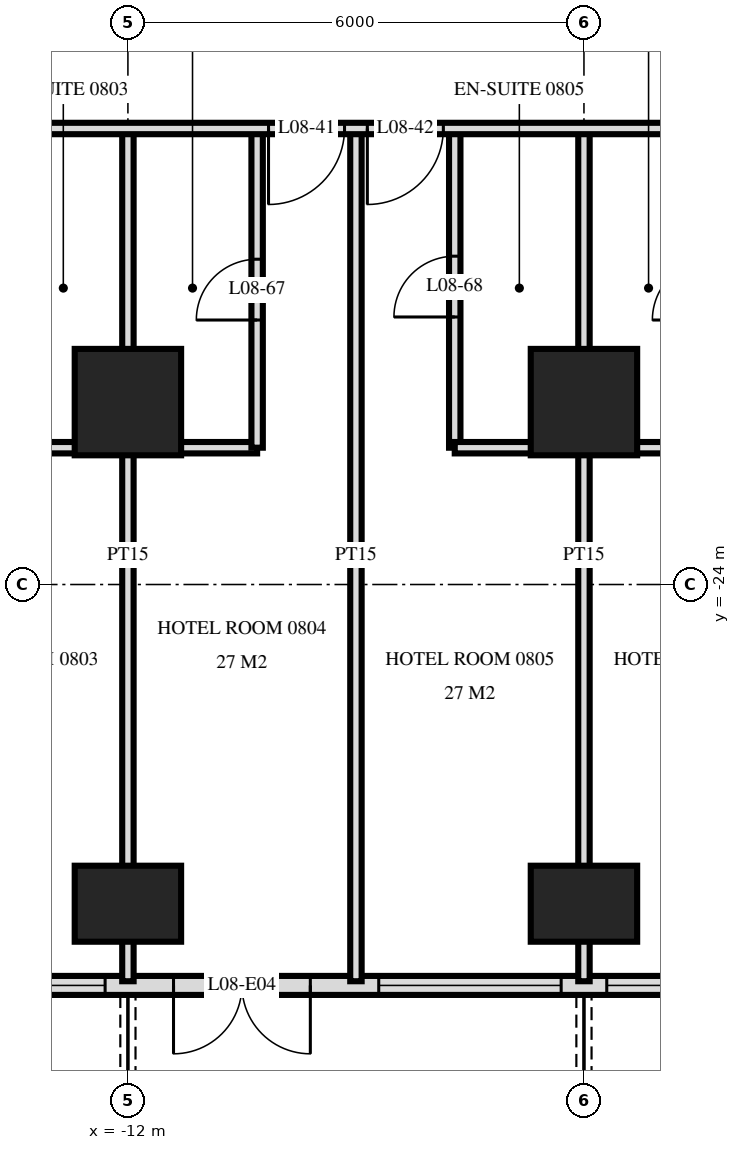
"""IFC4 building model, lengths in metres.
Left out: names, types, materials, properties, quantities, classifications, styles, units other than length and angle.
Written with IfcOpenShell. Run it as: python <this file> out.ifc"""

import sys

from ifc_helpers import new_model, si_unit, direction, frame, frame_2d, origin, origin_2d, place, context, subcontext, project, spatial, rectangle, extrude, element, fill, save


model = new_model("IFC4")
c1 = context("Model", 3, precision=1e-05, world=origin(), true_north=direction((0.0, 1.0)))
c2 = subcontext(c1, "Body", "Model", "MODEL_VIEW")
j1 = project(units=[si_unit("LENGTHUNIT", "METRE"), si_unit("PLANEANGLEUNIT", "RADIAN")], contexts=[c1])
p1 = place(None, origin())
s1 = spatial("IfcSite", under=j1, at=p1, CompositionType="ELEMENT")
p2 = place(p1, origin())
s2 = spatial("IfcBuilding", under=s1, at=p2, CompositionType="ELEMENT")
p3 = place(p2, frame((0.0, 0.0, 38.4)))
s3 = spatial("IfcBuildingStorey", under=s2, at=p3, CompositionType="ELEMENT", Elevation=38.4)
p4 = place(p3, frame((-12.0, -28.2, 0.0), z_axis=(0.0, 0.0, 1.0), x_axis=(1.0, 0.0, 0.0)))
e1 = element("IfcColumn", 1, at=p4, inside=s3, PredefinedType="COLUMN", context=c2, shape_type="SweptSolid", body=[
    extrude(rectangle(XDim=1.4, YDim=1.0, at=origin_2d()), origin(), (0.0, 0.0, 1.0), 3.6),
])
p5 = place(p3, frame((-12.0, -21.6, 0.0), z_axis=(0.0, 0.0, 1.0), x_axis=(1.0, 0.0, 0.0)))
e2 = element("IfcColumn", 2, at=p5, inside=s3, PredefinedType="COLUMN", context=c2, shape_type="SweptSolid", body=[
    extrude(rectangle(XDim=1.4, YDim=1.4, at=origin_2d()), origin(), (0.0, 0.0, 1.0), 3.6),
])
p6 = place(p3, frame((-6.0, -28.2, 0.0), z_axis=(0.0, 0.0, 1.0), x_axis=(1.0, 0.0, 0.0)))
e3 = element("IfcColumn", 3, at=p6, inside=s3, PredefinedType="COLUMN", context=c2, shape_type="SweptSolid", body=[
    extrude(rectangle(XDim=1.4, YDim=1.0, at=origin_2d()), origin(), (0.0, 0.0, 1.0), 3.6),
])
p7 = place(p3, frame((-6.0, -21.6, 0.0), z_axis=(0.0, 0.0, 1.0), x_axis=(1.0, 0.0, 0.0)))
e4 = element("IfcColumn", 4, at=p7, inside=s3, PredefinedType="COLUMN", context=c2, shape_type="SweptSolid", body=[
    extrude(rectangle(XDim=1.4, YDim=1.4, at=origin_2d()), origin(), (0.0, 0.0, 1.0), 3.6),
])
p8 = place(p3, frame((-28.775, -29.275, 0.0), z_axis=(0.0, 0.0, 1.0), x_axis=(1.0, 0.0, 0.0)))
e5 = element("IfcWall", 5, at=p8, inside=s3, PredefinedType="SOLIDWALL", context=c2, shape_type="SweptSolid", body=[
    extrude(rectangle(XDim=57.551, YDim=0.25, at=frame_2d((28.775, 0.0))), origin(), (0.0, 0.0, 1.0), 3.32),
])
p9 = place(p8, frame((0.575, 0.0, 0.0)))
e6 = element("IfcOpeningElement", 6, at=p9, cuts=e5, PredefinedType="OPENING", context=c2, shape_type="SweptSolid", body=[
    extrude(rectangle(XDim=1.8, YDim=2.4, at=frame_2d((0.9, 1.2))), frame((0.0, 0.135, 0.0), z_axis=(0.0, -1.0, 0.0), x_axis=(1.0, 0.0, 0.0)), (0.0, 0.0, 1.0), 0.27),
])
p10 = place(p8, frame((5.375, 0.0, 0.0)))
e7 = element("IfcOpeningElement", 7, at=p10, cuts=e5, PredefinedType="OPENING", context=c2, shape_type="SweptSolid", body=[
    extrude(rectangle(XDim=1.8, YDim=2.4, at=frame_2d((0.9, 1.2))), frame((0.0, 0.135, 0.0), z_axis=(0.0, -1.0, 0.0), x_axis=(1.0, 0.0, 0.0)), (0.0, 0.0, 1.0), 0.27),
])
p11 = place(p8, frame((8.075, 0.0, 0.3)))
e8 = element("IfcOpeningElement", 8, at=p11, cuts=e5, PredefinedType="OPENING", context=c2, shape_type="SweptSolid", body=[
    extrude(rectangle(XDim=2.4, YDim=2.1, at=frame_2d((1.2, 1.05))), frame((0.0, 0.135, 0.0), z_axis=(0.0, -1.0, 0.0), x_axis=(1.0, 0.0, 0.0)), (0.0, 0.0, 1.0), 0.27),
])
p12 = place(p8, frame((11.375, 0.0, 0.0)))
e9 = element("IfcOpeningElement", 9, at=p12, cuts=e5, PredefinedType="OPENING", context=c2, shape_type="SweptSolid", body=[
    extrude(rectangle(XDim=1.8, YDim=2.4, at=frame_2d((0.9, 1.2))), frame((0.0, 0.135, 0.0), z_axis=(0.0, -1.0, 0.0), x_axis=(1.0, 0.0, 0.0)), (0.0, 0.0, 1.0), 0.27),
])
p13 = place(p8, frame((14.075, 0.0, 0.3)))
e10 = element("IfcOpeningElement", 10, at=p13, cuts=e5, PredefinedType="OPENING", context=c2, shape_type="SweptSolid", body=[
    extrude(rectangle(XDim=2.4, YDim=2.1, at=frame_2d((1.2, 1.05))), frame((0.0, 0.135, 0.0), z_axis=(0.0, -1.0, 0.0), x_axis=(1.0, 0.0, 0.0)), (0.0, 0.0, 1.0), 0.27),
])
p14 = place(p8, frame((17.375, 0.0, 0.0)))
e11 = element("IfcOpeningElement", 11, at=p14, cuts=e5, PredefinedType="OPENING", context=c2, shape_type="SweptSolid", body=[
    extrude(rectangle(XDim=1.8, YDim=2.4, at=frame_2d((0.9, 1.2))), frame((0.0, 0.135, 0.0), z_axis=(0.0, -1.0, 0.0), x_axis=(1.0, 0.0, 0.0)), (0.0, 0.0, 1.0), 0.27),
])
p15 = place(p8, frame((20.075, 0.0, 0.3)))
e12 = element("IfcOpeningElement", 12, at=p15, cuts=e5, PredefinedType="OPENING", context=c2, shape_type="SweptSolid", body=[
    extrude(rectangle(XDim=2.4, YDim=2.1, at=frame_2d((1.2, 1.05))), frame((0.0, 0.135, 0.0), z_axis=(0.0, -1.0, 0.0), x_axis=(1.0, 0.0, 0.0)), (0.0, 0.0, 1.0), 0.27),
])
p16 = place(p8, frame((23.075, 0.0, 0.3)))
e13 = element("IfcOpeningElement", 13, at=p16, cuts=e5, PredefinedType="OPENING", context=c2, shape_type="SweptSolid", body=[
    extrude(rectangle(XDim=2.4, YDim=2.1, at=frame_2d((1.2, 1.05))), frame((0.0, 0.135, 0.0), z_axis=(0.0, -1.0, 0.0), x_axis=(1.0, 0.0, 0.0)), (0.0, 0.0, 1.0), 0.27),
])
p17 = place(p8, frame((26.375, 0.0, 0.0)))
e14 = element("IfcOpeningElement", 14, at=p17, cuts=e5, PredefinedType="OPENING", context=c2, shape_type="SweptSolid", body=[
    extrude(rectangle(XDim=1.8, YDim=2.4, at=frame_2d((0.9, 1.2))), frame((0.0, 0.135, 0.0), z_axis=(0.0, -1.0, 0.0), x_axis=(1.0, 0.0, 0.0)), (0.0, 0.0, 1.0), 0.27),
])
p18 = place(p8, frame((29.375, 0.0, 0.0)))
e15 = element("IfcOpeningElement", 15, at=p18, cuts=e5, PredefinedType="OPENING", context=c2, shape_type="SweptSolid", body=[
    extrude(rectangle(XDim=1.8, YDim=2.4, at=frame_2d((0.9, 1.2))), frame((0.0, 0.135, 0.0), z_axis=(0.0, -1.0, 0.0), x_axis=(1.0, 0.0, 0.0)), (0.0, 0.0, 1.0), 0.27),
])
p19 = place(p8, frame((32.075, 0.0, 0.3)))
e16 = element("IfcOpeningElement", 16, at=p19, cuts=e5, PredefinedType="OPENING", context=c2, shape_type="SweptSolid", body=[
    extrude(rectangle(XDim=2.4, YDim=2.1, at=frame_2d((1.2, 1.05))), frame((0.0, 0.135, 0.0), z_axis=(0.0, -1.0, 0.0), x_axis=(1.0, 0.0, 0.0)), (0.0, 0.0, 1.0), 0.27),
])
p20 = place(p8, frame((35.375, 0.0, 0.0)))
e17 = element("IfcOpeningElement", 17, at=p20, cuts=e5, PredefinedType="OPENING", context=c2, shape_type="SweptSolid", body=[
    extrude(rectangle(XDim=1.8, YDim=2.4, at=frame_2d((0.9, 1.2))), frame((0.0, 0.135, 0.0), z_axis=(0.0, -1.0, 0.0), x_axis=(1.0, 0.0, 0.0)), (0.0, 0.0, 1.0), 0.27),
])
p21 = place(p8, frame((38.075, 0.0, 0.3)))
e18 = element("IfcOpeningElement", 18, at=p21, cuts=e5, PredefinedType="OPENING", context=c2, shape_type="SweptSolid", body=[
    extrude(rectangle(XDim=2.4, YDim=2.1, at=frame_2d((1.2, 1.05))), frame((0.0, 0.135, 0.0), z_axis=(0.0, -1.0, 0.0), x_axis=(1.0, 0.0, 0.0)), (0.0, 0.0, 1.0), 0.27),
])
p22 = place(p8, frame((41.375, 0.0, 0.0)))
e19 = element("IfcOpeningElement", 19, at=p22, cuts=e5, PredefinedType="OPENING", context=c2, shape_type="SweptSolid", body=[
    extrude(rectangle(XDim=1.8, YDim=2.4, at=frame_2d((0.9, 1.2))), frame((0.0, 0.135, 0.0), z_axis=(0.0, -1.0, 0.0), x_axis=(1.0, 0.0, 0.0)), (0.0, 0.0, 1.0), 0.27),
])
p23 = place(p8, frame((44.075, 0.0, 0.3)))
e20 = element("IfcOpeningElement", 20, at=p23, cuts=e5, PredefinedType="OPENING", context=c2, shape_type="SweptSolid", body=[
    extrude(rectangle(XDim=2.4, YDim=2.1, at=frame_2d((1.2, 1.05))), frame((0.0, 0.135, 0.0), z_axis=(0.0, -1.0, 0.0), x_axis=(1.0, 0.0, 0.0)), (0.0, 0.0, 1.0), 0.27),
])
p24 = place(p8, frame((47.375, 0.0, 0.0)))
e21 = element("IfcOpeningElement", 21, at=p24, cuts=e5, PredefinedType="OPENING", context=c2, shape_type="SweptSolid", body=[
    extrude(rectangle(XDim=1.8, YDim=2.4, at=frame_2d((0.9, 1.2))), frame((0.0, 0.135, 0.0), z_axis=(0.0, -1.0, 0.0), x_axis=(1.0, 0.0, 0.0)), (0.0, 0.0, 1.0), 0.27),
])
p25 = place(p8, frame((50.075, 0.0, 0.3)))
e22 = element("IfcOpeningElement", 22, at=p25, cuts=e5, PredefinedType="OPENING", context=c2, shape_type="SweptSolid", body=[
    extrude(rectangle(XDim=2.4, YDim=2.1, at=frame_2d((1.2, 1.05))), frame((0.0, 0.135, 0.0), z_axis=(0.0, -1.0, 0.0), x_axis=(1.0, 0.0, 0.0)), (0.0, 0.0, 1.0), 0.27),
])
p26 = place(p8, frame((53.375, 0.0, 0.0)))
e23 = element("IfcOpeningElement", 23, at=p26, cuts=e5, PredefinedType="OPENING", context=c2, shape_type="SweptSolid", body=[
    extrude(rectangle(XDim=1.8, YDim=2.4, at=frame_2d((0.9, 1.2))), frame((0.0, 0.135, 0.0), z_axis=(0.0, -1.0, 0.0), x_axis=(1.0, 0.0, 0.0)), (0.0, 0.0, 1.0), 0.27),
])
p27 = place(p3, frame((-6.0, -29.22, 0.0), z_axis=(0.0, 0.0, 1.0), x_axis=(0.0, 1.0, 0.0)))
e24 = element("IfcWall", 24, at=p27, inside=s3, PredefinedType="PARTITIONING", context=c2, shape_type="SweptSolid", body=[
    extrude(rectangle(XDim=11.22, YDim=0.15, at=frame_2d((5.61, 0.0))), origin(), (0.0, 0.0, 1.0), 3.32),
])
p28 = place(p3, frame((-7.7, -22.2, 0.0), z_axis=(0.0, 0.0, 1.0), x_axis=(0.0, 1.0, 0.0)))
e25 = element("IfcWall", 25, at=p28, inside=s3, PredefinedType="PARTITIONING", context=c2, shape_type="SweptSolid", body=[
    extrude(rectangle(XDim=4.2, YDim=0.15, at=frame_2d((2.1, 0.0))), origin(), (0.0, 0.0, 1.0), 3.32),
])
p29 = place(p28, frame((1.72, 0.0, 0.0)))
e26 = element("IfcOpeningElement", 26, at=p29, cuts=e25, PredefinedType="OPENING", context=c2, shape_type="SweptSolid", body=[
    extrude(rectangle(XDim=0.8, YDim=2.1, at=frame_2d((0.4, 1.05))), frame((0.0, 0.085, 0.0), z_axis=(0.0, -1.0, 0.0), x_axis=(1.0, 0.0, 0.0)), (0.0, 0.0, 1.0), 0.17),
])
p30 = place(p3, frame((-9.0, -29.22, 0.0), z_axis=(0.0, 0.0, 1.0), x_axis=(0.0, 1.0, 0.0)))
e27 = element("IfcWall", 27, at=p30, inside=s3, PredefinedType="PARTITIONING", context=c2, shape_type="SweptSolid", body=[
    extrude(rectangle(XDim=11.22, YDim=0.15, at=frame_2d((5.61, 0.0))), origin(), (0.0, 0.0, 1.0), 3.32),
])
p31 = place(p3, frame((-10.3, -22.2, 0.0), z_axis=(0.0, 0.0, 1.0), x_axis=(0.0, 1.0, 0.0)))
e28 = element("IfcWall", 28, at=p31, inside=s3, PredefinedType="PARTITIONING", context=c2, shape_type="SweptSolid", body=[
    extrude(rectangle(XDim=4.2, YDim=0.15, at=frame_2d((2.1, 0.0))), origin(), (0.0, 0.0, 1.0), 3.32),
])
p32 = place(p31, frame((1.68, 0.0, 0.0)))
e29 = element("IfcOpeningElement", 29, at=p32, cuts=e28, PredefinedType="OPENING", context=c2, shape_type="SweptSolid", body=[
    extrude(rectangle(XDim=0.8, YDim=2.1, at=frame_2d((0.4, 1.05))), frame((0.0, 0.085, 0.0), z_axis=(0.0, -1.0, 0.0), x_axis=(1.0, 0.0, 0.0)), (0.0, 0.0, 1.0), 0.17),
])
p33 = place(p3, frame((-12.0, -29.22, 0.0), z_axis=(0.0, 0.0, 1.0), x_axis=(0.0, 1.0, 0.0)))
e30 = element("IfcWall", 30, at=p33, inside=s3, PredefinedType="PARTITIONING", context=c2, shape_type="SweptSolid", body=[
    extrude(rectangle(XDim=11.22, YDim=0.15, at=frame_2d((5.61, 0.0))), origin(), (0.0, 0.0, 1.0), 3.32),
])
for number, where, z_axis, x_axis in (
    (31, (-13.7, -22.2, 0.0), (0.0, 0.0, 1.0), (1.0, 0.0, 0.0)),
    (32, (-7.7, -22.2, 0.0), (0.0, 0.0, 1.0), (1.0, 0.0, 0.0)),
):
    element("IfcWall", number, at=place(p3, frame(where, z_axis=z_axis, x_axis=x_axis)), inside=s3, PredefinedType="PARTITIONING", context=c2, shape_type="SweptSolid", body=[
        extrude(rectangle(XDim=3.4, YDim=0.15, at=frame_2d((1.7, 0.0))), origin(), (0.0, 0.0, 1.0), 3.32),
    ])
p34 = place(p3, frame((-33.12, -18.0, 0.0), z_axis=(0.0, 0.0, 1.0), x_axis=(1.0, 0.0, 0.0)))
e33 = element("IfcWall", 33, at=p34, inside=s3, PredefinedType="PARTITIONING", context=c2, shape_type="SweptSolid", body=[
    extrude(rectangle(XDim=66.24, YDim=0.15, at=frame_2d((33.12, 0.0))), origin(), (0.0, 0.0, 1.0), 3.32),
])
p35 = place(p34, frame((12.27, 0.0, 0.0)))
e34 = element("IfcOpeningElement", 34, at=p35, cuts=e33, PredefinedType="OPENING", context=c2, shape_type="SweptSolid", body=[
    extrude(rectangle(XDim=1.0, YDim=2.1, at=frame_2d((0.5, 1.05))), frame((0.0, 0.085, 0.0), z_axis=(0.0, -1.0, 0.0), x_axis=(1.0, 0.0, 0.0)), (0.0, 0.0, 1.0), 0.17),
])
p36 = place(p34, frame((16.97, 0.0, 0.0)))
e35 = element("IfcOpeningElement", 35, at=p36, cuts=e33, PredefinedType="OPENING", context=c2, shape_type="SweptSolid", body=[
    extrude(rectangle(XDim=1.0, YDim=2.1, at=frame_2d((0.5, 1.05))), frame((0.0, 0.085, 0.0), z_axis=(0.0, -1.0, 0.0), x_axis=(1.0, 0.0, 0.0)), (0.0, 0.0, 1.0), 0.17),
])
p37 = place(p34, frame((18.27, 0.0, 0.0)))
e36 = element("IfcOpeningElement", 36, at=p37, cuts=e33, PredefinedType="OPENING", context=c2, shape_type="SweptSolid", body=[
    extrude(rectangle(XDim=1.0, YDim=2.1, at=frame_2d((0.5, 1.05))), frame((0.0, 0.085, 0.0), z_axis=(0.0, -1.0, 0.0), x_axis=(1.0, 0.0, 0.0)), (0.0, 0.0, 1.0), 0.17),
])
p38 = place(p34, frame((22.97, 0.0, 0.0)))
e37 = element("IfcOpeningElement", 37, at=p38, cuts=e33, PredefinedType="OPENING", context=c2, shape_type="SweptSolid", body=[
    extrude(rectangle(XDim=1.0, YDim=2.1, at=frame_2d((0.5, 1.05))), frame((0.0, 0.085, 0.0), z_axis=(0.0, -1.0, 0.0), x_axis=(1.0, 0.0, 0.0)), (0.0, 0.0, 1.0), 0.17),
])
p39 = place(p34, frame((24.27, 0.0, 0.0)))
e38 = element("IfcOpeningElement", 38, at=p39, cuts=e33, PredefinedType="OPENING", context=c2, shape_type="SweptSolid", body=[
    extrude(rectangle(XDim=1.0, YDim=2.1, at=frame_2d((0.5, 1.05))), frame((0.0, 0.085, 0.0), z_axis=(0.0, -1.0, 0.0), x_axis=(1.0, 0.0, 0.0)), (0.0, 0.0, 1.0), 0.17),
])
p40 = place(p34, frame((28.97, 0.0, 0.0)))
e39 = element("IfcOpeningElement", 39, at=p40, cuts=e33, PredefinedType="OPENING", context=c2, shape_type="SweptSolid", body=[
    extrude(rectangle(XDim=1.0, YDim=2.1, at=frame_2d((0.5, 1.05))), frame((0.0, 0.085, 0.0), z_axis=(0.0, -1.0, 0.0), x_axis=(1.0, 0.0, 0.0)), (0.0, 0.0, 1.0), 0.17),
])
p41 = place(p34, frame((30.27, 0.0, 0.0)))
e40 = element("IfcOpeningElement", 40, at=p41, cuts=e33, PredefinedType="OPENING", context=c2, shape_type="SweptSolid", body=[
    extrude(rectangle(XDim=1.0, YDim=2.1, at=frame_2d((0.5, 1.05))), frame((0.0, 0.085, 0.0), z_axis=(0.0, -1.0, 0.0), x_axis=(1.0, 0.0, 0.0)), (0.0, 0.0, 1.0), 0.17),
])
p42 = place(p34, frame((34.97, 0.0, 0.0)))
e41 = element("IfcOpeningElement", 41, at=p42, cuts=e33, PredefinedType="OPENING", context=c2, shape_type="SweptSolid", body=[
    extrude(rectangle(XDim=1.0, YDim=2.1, at=frame_2d((0.5, 1.05))), frame((0.0, 0.085, 0.0), z_axis=(0.0, -1.0, 0.0), x_axis=(1.0, 0.0, 0.0)), (0.0, 0.0, 1.0), 0.17),
])
p43 = place(p34, frame((37.27, 0.0, 0.0)))
e42 = element("IfcOpeningElement", 42, at=p43, cuts=e33, PredefinedType="OPENING", context=c2, shape_type="SweptSolid", body=[
    extrude(rectangle(XDim=1.0, YDim=2.1, at=frame_2d((0.5, 1.05))), frame((0.0, 0.085, 0.0), z_axis=(0.0, -1.0, 0.0), x_axis=(1.0, 0.0, 0.0)), (0.0, 0.0, 1.0), 0.17),
])
p44 = place(p34, frame((43.97, 0.0, 0.0)))
e43 = element("IfcOpeningElement", 43, at=p44, cuts=e33, PredefinedType="OPENING", context=c2, shape_type="SweptSolid", body=[
    extrude(rectangle(XDim=1.0, YDim=2.1, at=frame_2d((0.5, 1.05))), frame((0.0, 0.085, 0.0), z_axis=(0.0, -1.0, 0.0), x_axis=(1.0, 0.0, 0.0)), (0.0, 0.0, 1.0), 0.17),
])
p45 = place(p34, frame((45.27, 0.0, 0.0)))
e44 = element("IfcOpeningElement", 44, at=p45, cuts=e33, PredefinedType="OPENING", context=c2, shape_type="SweptSolid", body=[
    extrude(rectangle(XDim=1.0, YDim=2.1, at=frame_2d((0.5, 1.05))), frame((0.0, 0.085, 0.0), z_axis=(0.0, -1.0, 0.0), x_axis=(1.0, 0.0, 0.0)), (0.0, 0.0, 1.0), 0.17),
])
p46 = place(p34, frame((51.22, 0.0, 0.0)))
e45 = element("IfcOpeningElement", 45, at=p46, cuts=e33, PredefinedType="OPENING", context=c2, shape_type="SweptSolid", body=[
    extrude(rectangle(XDim=1.0, YDim=2.1, at=frame_2d((0.5, 1.05))), frame((0.0, 0.085, 0.0), z_axis=(0.0, -1.0, 0.0), x_axis=(1.0, 0.0, 0.0)), (0.0, 0.0, 1.0), 0.17),
])
p47 = place(p34, frame((54.27, 0.0, 0.0)))
e46 = element("IfcOpeningElement", 46, at=p47, cuts=e33, PredefinedType="OPENING", context=c2, shape_type="SweptSolid", body=[
    extrude(rectangle(XDim=1.0, YDim=2.1, at=frame_2d((0.5, 1.05))), frame((0.0, 0.085, 0.0), z_axis=(0.0, -1.0, 0.0), x_axis=(1.0, 0.0, 0.0)), (0.0, 0.0, 1.0), 0.17),
])
p48 = place(p34, frame((6.07, 0.0, 0.0)))
e47 = element("IfcOpeningElement", 47, at=p48, cuts=e33, PredefinedType="OPENING", context=c2, shape_type="SweptSolid", body=[
    extrude(rectangle(XDim=1.0, YDim=2.1, at=frame_2d((0.5, 1.05))), frame((0.0, 0.085, 0.0), z_axis=(0.0, -1.0, 0.0), x_axis=(1.0, 0.0, 0.0)), (0.0, 0.0, 1.0), 0.17),
])
p49 = place(p34, frame((63.37, 0.0, 0.0)))
e48 = element("IfcOpeningElement", 48, at=p49, cuts=e33, PredefinedType="OPENING", context=c2, shape_type="SweptSolid", body=[
    extrude(rectangle(XDim=1.0, YDim=2.1, at=frame_2d((0.5, 1.05))), frame((0.0, 0.085, 0.0), z_axis=(0.0, -1.0, 0.0), x_axis=(1.0, 0.0, 0.0)), (0.0, 0.0, 1.0), 0.17),
])
p50 = place(p13, origin())
e49 = element("IfcWindow", 49, at=p50, inside=s3, PartitioningType="SINGLE_PANEL", PredefinedType="WINDOW", context=c2, shape_type="SweptSolid", body=[
    extrude(rectangle(XDim=2.4, YDim=2.1, at=frame_2d((1.2, 1.05))), frame((0.0, 0.03, 0.0), z_axis=(0.0, -1.0, 0.0), x_axis=(1.0, 0.0, 0.0)), (0.0, 0.0, 1.0), 0.06),
])
fill(e10, e49)
p51 = place(p14, frame((0.9, 0.0, 0.0), z_axis=(0.0, 0.0, 1.0), x_axis=(-1.0, 0.0, 0.0)))
e50 = element("IfcDoor", 50, at=p51, inside=s3, OperationType="DOUBLE_DOOR_SINGLE_SWING", PredefinedType="DOOR", context=c2, shape_type="SweptSolid", body=[
    extrude(rectangle(XDim=1.8, YDim=2.4, at=frame_2d((0.0, 1.2))), frame((0.0, -0.025, 0.0), z_axis=(0.0, 1.0, 0.0), x_axis=(-1.0, 0.0, 0.0)), (0.0, 0.0, 1.0), 0.05),
])
fill(e11, e50)
p52 = place(p15, origin())
e51 = element("IfcWindow", 51, at=p52, inside=s3, PartitioningType="SINGLE_PANEL", PredefinedType="WINDOW", context=c2, shape_type="SweptSolid", body=[
    extrude(rectangle(XDim=2.4, YDim=2.1, at=frame_2d((1.2, 1.05))), frame((0.0, 0.03, 0.0), z_axis=(0.0, -1.0, 0.0), x_axis=(1.0, 0.0, 0.0)), (0.0, 0.0, 1.0), 0.06),
])
fill(e12, e51)
p53 = place(p16, origin())
e52 = element("IfcWindow", 52, at=p53, inside=s3, PartitioningType="SINGLE_PANEL", PredefinedType="WINDOW", context=c2, shape_type="SweptSolid", body=[
    extrude(rectangle(XDim=2.4, YDim=2.1, at=frame_2d((1.2, 1.05))), frame((0.0, 0.03, 0.0), z_axis=(0.0, -1.0, 0.0), x_axis=(1.0, 0.0, 0.0)), (0.0, 0.0, 1.0), 0.06),
])
fill(e13, e52)
p54 = place(p38, frame((0.5, 0.0, 0.0), z_axis=(0.0, 0.0, 1.0), x_axis=(-1.0, 0.0, 0.0)))
e53 = element("IfcDoor", 53, at=p54, inside=s3, OperationType="SINGLE_SWING_LEFT", PredefinedType="DOOR", context=c2, shape_type="SweptSolid", body=[
    extrude(rectangle(XDim=1.0, YDim=2.1, at=frame_2d((0.0, 1.05))), frame((0.0, -0.025, 0.0), z_axis=(0.0, 1.0, 0.0), x_axis=(-1.0, 0.0, 0.0)), (0.0, 0.0, 1.0), 0.05),
])
fill(e37, e53)
p55 = place(p39, frame((0.5, 0.0, 0.0), z_axis=(0.0, 0.0, 1.0), x_axis=(-1.0, 0.0, 0.0)))
e54 = element("IfcDoor", 54, at=p55, inside=s3, OperationType="SINGLE_SWING_LEFT", PredefinedType="DOOR", context=c2, shape_type="SweptSolid", body=[
    extrude(rectangle(XDim=1.0, YDim=2.1, at=frame_2d((0.0, 1.05))), frame((0.0, -0.025, 0.0), z_axis=(0.0, 1.0, 0.0), x_axis=(-1.0, 0.0, 0.0)), (0.0, 0.0, 1.0), 0.05),
])
fill(e38, e54)
p56 = place(p32, origin())
e55 = element("IfcDoor", 55, at=p56, inside=s3, OperationType="SINGLE_SWING_RIGHT", PredefinedType="DOOR", context=c2, shape_type="SweptSolid", body=[
    extrude(rectangle(XDim=0.8, YDim=2.1, at=frame_2d((0.4, 1.05))), frame((0.0, 0.025, 0.0), z_axis=(0.0, -1.0, 0.0), x_axis=(1.0, 0.0, 0.0)), (0.0, 0.0, 1.0), 0.05),
])
fill(e29, e55)
p57 = place(p29, origin())
e56 = element("IfcDoor", 56, at=p57, inside=s3, OperationType="SINGLE_SWING_RIGHT", PredefinedType="DOOR", context=c2, shape_type="SweptSolid", body=[
    extrude(rectangle(XDim=0.8, YDim=2.1, at=frame_2d((0.4, 1.05))), frame((0.0, 0.025, 0.0), z_axis=(0.0, -1.0, 0.0), x_axis=(1.0, 0.0, 0.0)), (0.0, 0.0, 1.0), 0.05),
])
fill(e26, e56)
save(model, sys.argv[1])
